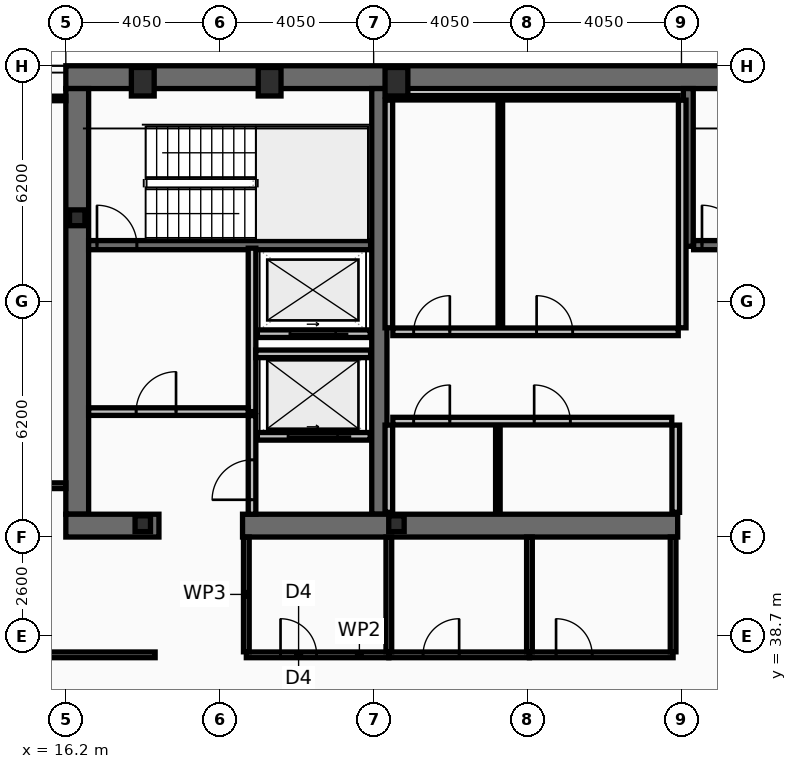
"""IFC4 building model, lengths in metres.
Left out: names, types, materials, properties, quantities, classifications, styles, units other than length and angle.
Written with IfcOpenShell. Run it as: python <this file> out.ifc"""

import sys

from ifc_helpers import new_model, si_unit, direction, frame, frame_2d, origin, origin_2d, place, context, subcontext, project, spatial, rectangle, hollow_rectangle, i_section, extrude, element, fill, save


model = new_model("IFC4")
c1 = context("Model", 3, precision=1e-05, world=origin(), true_north=direction((0.0, 1.0)))
c2 = subcontext(c1, "Body", "Model", "MODEL_VIEW")
j1 = project(units=[si_unit("LENGTHUNIT", "METRE"), si_unit("PLANEANGLEUNIT", "RADIAN")], contexts=[c1])
p1 = place(None, origin())
s1 = spatial("IfcSite", under=j1, at=p1, CompositionType="ELEMENT")
p2 = place(p1, origin())
s2 = spatial("IfcBuilding", under=s1, at=p2, CompositionType="ELEMENT")
p3 = place(p2, frame((0.0, 0.0, 231.8)))
s3 = spatial("IfcBuildingStorey", under=s2, at=p3, CompositionType="ELEMENT", Elevation=231.8)
p4 = place(p3, frame((16.2, 53.4, 0.0), z_axis=(0.0, 0.0, 1.0), x_axis=(1.0, 0.0, 0.0)))
e1 = element("IfcWall", 1, at=p4, inside=s3, PredefinedType="SHEAR", context=c2, shape_type="SweptSolid", body=[
    extrude(rectangle(XDim=40.5, YDim=0.6, at=frame_2d((20.25, 0.0))), origin(), (0.0, 0.0, 1.0), 3.44),
])
p5 = place(p3, frame((16.5, 41.9, 0.0), z_axis=(0.0, 0.0, 1.0), x_axis=(0.0, 1.0, 0.0)))
e2 = element("IfcWall", 2, at=p5, inside=s3, PredefinedType="SHEAR", context=c2, shape_type="SweptSolid", body=[
    extrude(rectangle(XDim=11.2, YDim=0.6, at=frame_2d((5.6, 0.0))), origin(), (0.0, 0.0, 1.0), 3.44),
])
p6 = place(p3, frame((24.45, 41.9, 0.0), z_axis=(0.0, 0.0, 1.0), x_axis=(0.0, 1.0, 0.0)))
e3 = element("IfcWall", 3, at=p6, inside=s3, PredefinedType="SHEAR", context=c2, shape_type="SweptSolid", body=[
    extrude(rectangle(XDim=11.2, YDim=0.4, at=frame_2d((5.6, 0.0))), origin(), (0.0, 0.0, 1.0), 3.44),
])
p7 = place(p3, frame((18.65, 41.6, 0.0), z_axis=(0.0, 0.0, 1.0), x_axis=(-1.0, 0.0, 0.0)))
e4 = element("IfcWall", 4, at=p7, inside=s3, PredefinedType="SHEAR", context=c2, shape_type="SweptSolid", body=[
    extrude(rectangle(XDim=2.45, YDim=0.6, at=frame_2d((1.225, 0.0))), origin(), (0.0, 0.0, 1.0), 3.44),
])
p8 = place(p3, frame((32.3, 41.6, 0.0), z_axis=(0.0, 0.0, 1.0), x_axis=(-1.0, 0.0, 0.0)))
e5 = element("IfcWall", 5, at=p8, inside=s3, PredefinedType="SHEAR", context=c2, shape_type="SweptSolid", body=[
    extrude(rectangle(XDim=11.45, YDim=0.6, at=frame_2d((5.725, 0.0))), origin(), (0.0, 0.0, 1.0), 3.44),
])
p9 = place(p3, frame((32.58, 48.95, 0.0), z_axis=(0.0, 0.0, 1.0), x_axis=(0.0, 1.0, 0.0)))
e6 = element("IfcWall", 6, at=p9, inside=s3, PredefinedType="SHEAR", context=c2, shape_type="SweptSolid", body=[
    extrude(rectangle(XDim=4.15, YDim=0.26, at=frame_2d((2.075, 0.0))), origin(), (0.0, 0.0, 1.0), 3.44),
])
p10 = place(p3, frame((16.8, 48.98, 0.0), z_axis=(0.0, 0.0, 1.0), x_axis=(1.0, 0.0, 0.0)))
e7 = element("IfcWall", 7, at=p10, inside=s3, PredefinedType="SHEAR", context=c2, shape_type="SweptSolid", body=[
    extrude(rectangle(XDim=7.42, YDim=0.24, at=frame_2d((3.71, 0.0))), origin(), (0.0, 0.0, 1.0), 3.44),
])
p11 = place(p10, frame((0.22, 0.0, 0.0)))
e8 = element("IfcOpeningElement", 8, at=p11, cuts=e7, PredefinedType="OPENING", context=c2, shape_type="SweptSolid", body=[
    extrude(rectangle(XDim=1.05, YDim=2.15, at=frame_2d((0.525, 1.075))), frame((0.0, 0.13, 0.0), z_axis=(0.0, -1.0, 0.0), x_axis=(1.0, 0.0, 0.0)), (0.0, 0.0, 1.0), 0.26),
])
p12 = place(p3, frame((32.72, 48.98, 0.0), z_axis=(0.0, 0.0, 1.0), x_axis=(1.0, 0.0, 0.0)))
e9 = element("IfcWall", 9, at=p12, inside=s3, PredefinedType="SHEAR", context=c2, shape_type="SweptSolid", body=[
    extrude(rectangle(XDim=7.56, YDim=0.24, at=frame_2d((3.78, 0.0))), origin(), (0.0, 0.0, 1.0), 3.44),
])
p13 = place(p12, frame((0.22, 0.0, 0.0)))
e10 = element("IfcOpeningElement", 10, at=p13, cuts=e9, PredefinedType="OPENING", context=c2, shape_type="SweptSolid", body=[
    extrude(rectangle(XDim=1.05, YDim=2.15, at=frame_2d((0.525, 1.075))), frame((0.0, 0.13, 0.0), z_axis=(0.0, -1.0, 0.0), x_axis=(1.0, 0.0, 0.0)), (0.0, 0.0, 1.0), 0.26),
])
for number, where, z_axis, x_axis in (
    (11, (18.225, 53.28, 0.0), (0.0, 0.0, 1.0), (1.0, 0.0, 0.0)),
    (12, (21.562, 53.28, 0.0), (0.0, 0.0, 1.0), (1.0, 0.0, 0.0)),
    (13, (24.9, 53.28, 0.0), (0.0, 0.0, 1.0), (1.0, 0.0, 0.0)),
):
    element("IfcColumn", number, at=place(p3, frame(where, z_axis=z_axis, x_axis=x_axis)), inside=s3, PredefinedType="COLUMN", context=c2, shape_type="SweptSolid", body=[
        extrude(hollow_rectangle(XDim=0.6, YDim=0.75, WallThickness=0.045, at=origin_2d()), origin(), (0.0, 0.0, 1.0), 3.6),
    ])
for number, where, z_axis, x_axis in (
    (14, (16.5, 49.7, 0.0), (0.0, 0.0, 1.0), (1.0, 0.0, 0.0)),
    (15, (18.225, 41.65, 0.0), (0.0, 0.0, 1.0), (1.0, 0.0, 0.0)),
    (16, (24.9, 41.65, 0.0), (0.0, 0.0, 1.0), (1.0, 0.0, 0.0)),
):
    element("IfcColumn", number, at=place(p3, frame(where, z_axis=z_axis, x_axis=x_axis)), inside=s3, PredefinedType="COLUMN", context=c2, shape_type="SweptSolid", body=[
        extrude(i_section(OverallWidth=0.406, OverallDepth=0.416, WebThickness=0.03, FlangeThickness=0.048, at=origin_2d()), origin(), (0.0, 0.0, 1.0), 3.6),
    ])
p14 = place(p3, frame((24.21, 43.95, 0.0), z_axis=(0.0, 0.0, 1.0), x_axis=(-1.0, 0.0, 0.0)))
e17 = element("IfcWall", 17, at=p14, inside=s3, PredefinedType="PARTITIONING", context=c2, shape_type="SweptSolid", body=[
    extrude(rectangle(XDim=2.97, YDim=0.2, at=frame_2d((1.485, 0.0))), origin(), (0.0, 0.0, 1.0), 3.44),
])
p15 = place(p14, frame((0.86, 0.0, 0.0)))
e18 = element("IfcOpeningElement", 18, at=p15, cuts=e17, PredefinedType="OPENING", context=c2, shape_type="SweptSolid", body=[
    extrude(rectangle(XDim=1.3, YDim=2.18, at=frame_2d((0.65, 1.09))), frame((0.0, 0.11, 0.0), z_axis=(0.0, -1.0, 0.0), x_axis=(1.0, 0.0, 0.0)), (0.0, 0.0, 1.0), 0.22),
])
p16 = place(p3, frame((24.21, 46.65, 0.0), z_axis=(0.0, 0.0, 1.0), x_axis=(-1.0, 0.0, 0.0)))
e19 = element("IfcWall", 19, at=p16, inside=s3, PredefinedType="PARTITIONING", context=c2, shape_type="SweptSolid", body=[
    extrude(rectangle(XDim=2.97, YDim=0.2, at=frame_2d((1.485, 0.0))), origin(), (0.0, 0.0, 1.0), 3.44),
])
p17 = place(p16, frame((0.91, 0.0, 0.0)))
e20 = element("IfcOpeningElement", 20, at=p17, cuts=e19, PredefinedType="OPENING", context=c2, shape_type="SweptSolid", body=[
    extrude(rectangle(XDim=1.2, YDim=2.18, at=frame_2d((0.6, 1.09))), frame((0.0, 0.11, 0.0), z_axis=(0.0, -1.0, 0.0), x_axis=(1.0, 0.0, 0.0)), (0.0, 0.0, 1.0), 0.22),
])
p18 = place(p3, frame((21.1, 44.6, 0.0), z_axis=(0.0, 0.0, 1.0), x_axis=(0.0, 1.0, 0.0)))
e21 = element("IfcWall", 21, at=p18, inside=s3, PredefinedType="PARTITIONING", context=c2, shape_type="SweptSolid", body=[
    extrude(rectangle(XDim=4.3, YDim=0.2, at=frame_2d((2.15, 0.0))), origin(), (0.0, 0.0, 1.0), 3.44),
])
p19 = place(p3, frame((16.8, 44.6, 0.0), z_axis=(0.0, 0.0, 1.0), x_axis=(1.0, 0.0, 0.0)))
e22 = element("IfcWall", 22, at=p19, inside=s3, PredefinedType="PARTITIONING", context=c2, shape_type="SweptSolid", body=[
    extrude(rectangle(XDim=4.2, YDim=0.2, at=frame_2d((2.1, 0.0))), origin(), (0.0, 0.0, 1.0), 3.44),
])
p20 = place(p19, frame((1.25, 0.0, 0.0)))
e23 = element("IfcOpeningElement", 23, at=p20, cuts=e22, PredefinedType="OPENING", context=c2, shape_type="SweptSolid", body=[
    extrude(rectangle(XDim=1.05, YDim=2.15, at=frame_2d((0.525, 1.075))), frame((0.0, 0.11, 0.0), z_axis=(0.0, -1.0, 0.0), x_axis=(1.0, 0.0, 0.0)), (0.0, 0.0, 1.0), 0.22),
])
p21 = place(p3, frame((21.2, 46.12, 0.0), z_axis=(0.0, 0.0, 1.0), x_axis=(1.0, 0.0, 0.0)))
e24 = element("IfcWall", 24, at=p21, inside=s3, PredefinedType="PARTITIONING", context=c2, shape_type="SweptSolid", body=[
    extrude(rectangle(XDim=3.02, YDim=0.2, at=frame_2d((1.51, 0.0))), origin(), (0.0, 0.0, 1.0), 3.44),
])
p22 = place(p3, frame((21.1, 41.9, 0.0), z_axis=(0.0, 0.0, 1.0), x_axis=(0.0, 1.0, 0.0)))
e25 = element("IfcWall", 25, at=p22, inside=s3, PredefinedType="PARTITIONING", context=c2, shape_type="SweptSolid", body=[
    extrude(rectangle(XDim=2.595, YDim=0.2, at=frame_2d((1.298, 0.0))), origin(), (0.0, 0.0, 1.0), 3.44),
])
p23 = place(p22, frame((0.38, 0.0, 0.0)))
e26 = element("IfcOpeningElement", 26, at=p23, cuts=e25, PredefinedType="OPENING", context=c2, shape_type="SweptSolid", body=[
    extrude(rectangle(XDim=1.05, YDim=2.15, at=frame_2d((0.525, 1.075))), frame((0.0, 0.11, 0.0), z_axis=(0.0, -1.0, 0.0), x_axis=(1.0, 0.0, 0.0)), (0.0, 0.0, 1.0), 0.22),
])
for number, where, z_axis, x_axis in (
    (27, (24.7, 46.805, 0.0), (0.0, 0.0, 1.0), (0.0, 1.0, 0.0)),
    (28, (32.42, 46.805, 0.0), (0.0, 0.0, 1.0), (0.0, 1.0, 0.0)),
):
    element("IfcWall", number, at=place(p3, frame(where, z_axis=z_axis, x_axis=x_axis)), inside=s3, PredefinedType="PARTITIONING", context=c2, shape_type="SweptSolid", body=[
        extrude(rectangle(XDim=5.99, YDim=0.2, at=frame_2d((2.995, 0.0))), origin(), (0.0, 0.0, 1.0), 3.44),
    ])
p24 = place(p3, frame((24.805, 52.86, 0.0), z_axis=(0.0, 0.0, 1.0), x_axis=(1.0, 0.0, 0.0)))
e29 = element("IfcWall", 29, at=p24, inside=s3, PredefinedType="PARTITIONING", context=c2, shape_type="SweptSolid", body=[
    extrude(rectangle(XDim=7.51, YDim=0.12, at=frame_2d((3.755, 0.0))), origin(), (0.0, 0.0, 1.0), 3.44),
])
p25 = place(p3, frame((27.634, 46.805, 0.0), z_axis=(0.0, 0.0, 1.0), x_axis=(0.0, 1.0, 0.0)))
e30 = element("IfcWall", 30, at=p25, inside=s3, PredefinedType="PARTITIONING", context=c2, shape_type="SweptSolid", body=[
    extrude(rectangle(XDim=5.99, YDim=0.12, at=frame_2d((2.995, 0.0))), origin(), (0.0, 0.0, 1.0), 3.44),
])
p26 = place(p3, frame((24.805, 46.7, 0.0), z_axis=(0.0, 0.0, 1.0), x_axis=(1.0, 0.0, 0.0)))
e31 = element("IfcWall", 31, at=p26, inside=s3, PredefinedType="PARTITIONING", context=c2, shape_type="SweptSolid", body=[
    extrude(rectangle(XDim=7.51, YDim=0.2, at=frame_2d((3.755, 0.0))), origin(), (0.0, 0.0, 1.0), 3.44),
])
p27 = place(p26, frame((0.55, 0.0, 0.0)))
e32 = element("IfcOpeningElement", 32, at=p27, cuts=e31, PredefinedType="OPENING", context=c2, shape_type="SweptSolid", body=[
    extrude(rectangle(XDim=0.95, YDim=2.1, at=frame_2d((0.475, 1.05))), frame((0.0, 0.11, 0.0), z_axis=(0.0, -1.0, 0.0), x_axis=(1.0, 0.0, 0.0)), (0.0, 0.0, 1.0), 0.22),
])
p28 = place(p26, frame((3.784, 0.0, 0.0)))
e33 = element("IfcOpeningElement", 33, at=p28, cuts=e31, PredefinedType="OPENING", context=c2, shape_type="SweptSolid", body=[
    extrude(rectangle(XDim=0.95, YDim=2.1, at=frame_2d((0.475, 1.05))), frame((0.0, 0.11, 0.0), z_axis=(0.0, -1.0, 0.0), x_axis=(1.0, 0.0, 0.0)), (0.0, 0.0, 1.0), 0.22),
])
for number, where, z_axis, x_axis in (
    (34, (24.7, 41.95, 0.0), (0.0, 0.0, 1.0), (0.0, 1.0, 0.0)),
    (35, (32.25, 41.95, 0.0), (0.0, 0.0, 1.0), (0.0, 1.0, 0.0)),
):
    element("IfcWall", number, at=place(p3, frame(where, z_axis=z_axis, x_axis=x_axis)), inside=s3, PredefinedType="PARTITIONING", context=c2, shape_type="SweptSolid", body=[
        extrude(rectangle(XDim=2.295, YDim=0.2, at=frame_2d((1.147, 0.0))), origin(), (0.0, 0.0, 1.0), 3.44),
    ])
p29 = place(p3, frame((27.569, 41.95, 0.0), z_axis=(0.0, 0.0, 1.0), x_axis=(0.0, 1.0, 0.0)))
e36 = element("IfcWall", 36, at=p29, inside=s3, PredefinedType="PARTITIONING", context=c2, shape_type="SweptSolid", body=[
    extrude(rectangle(XDim=2.295, YDim=0.12, at=frame_2d((1.147, 0.0))), origin(), (0.0, 0.0, 1.0), 3.44),
])
p30 = place(p3, frame((24.805, 44.35, 0.0), z_axis=(0.0, 0.0, 1.0), x_axis=(1.0, 0.0, 0.0)))
e37 = element("IfcWall", 37, at=p30, inside=s3, PredefinedType="PARTITIONING", context=c2, shape_type="SweptSolid", body=[
    extrude(rectangle(XDim=7.34, YDim=0.2, at=frame_2d((3.67, 0.0))), origin(), (0.0, 0.0, 1.0), 3.44),
])
p31 = place(p30, frame((0.55, 0.0, 0.0)))
e38 = element("IfcOpeningElement", 38, at=p31, cuts=e37, PredefinedType="OPENING", context=c2, shape_type="SweptSolid", body=[
    extrude(rectangle(XDim=0.95, YDim=2.1, at=frame_2d((0.475, 1.05))), frame((0.0, 0.11, 0.0), z_axis=(0.0, -1.0, 0.0), x_axis=(1.0, 0.0, 0.0)), (0.0, 0.0, 1.0), 0.22),
])
p32 = place(p30, frame((3.719, 0.0, 0.0)))
e39 = element("IfcOpeningElement", 39, at=p32, cuts=e37, PredefinedType="OPENING", context=c2, shape_type="SweptSolid", body=[
    extrude(rectangle(XDim=0.95, YDim=2.1, at=frame_2d((0.475, 1.05))), frame((0.0, 0.11, 0.0), z_axis=(0.0, -1.0, 0.0), x_axis=(1.0, 0.0, 0.0)), (0.0, 0.0, 1.0), 0.22),
])
p33 = place(p3, frame((20.95, 38.2, 0.0), z_axis=(0.0, 0.0, 1.0), x_axis=(1.0, 0.0, 0.0)))
e40 = element("IfcWall", 40, at=p33, inside=s3, PredefinedType="PARTITIONING", context=c2, shape_type="SweptSolid", body=[
    extrude(rectangle(XDim=3.75, YDim=0.15, at=frame_2d((1.875, 0.0))), origin(), (0.0, 0.0, 1.0), 2.78),
])
p34 = place(p33, frame((0.9, 0.0, 0.0)))
e41 = element("IfcOpeningElement", 41, at=p34, cuts=e40, PredefinedType="OPENING", context=c2, shape_type="SweptSolid", body=[
    extrude(rectangle(XDim=0.95, YDim=2.05, at=frame_2d((0.475, 1.025))), frame((0.0, 0.085, 0.0), z_axis=(0.0, -1.0, 0.0), x_axis=(1.0, 0.0, 0.0)), (0.0, 0.0, 1.0), 0.17),
])
p35 = place(p3, frame((24.7, 38.2, 0.0), z_axis=(0.0, 0.0, 1.0), x_axis=(1.0, 0.0, 0.0)))
e42 = element("IfcWall", 42, at=p35, inside=s3, PredefinedType="PARTITIONING", context=c2, shape_type="SweptSolid", body=[
    extrude(rectangle(XDim=3.7, YDim=0.15, at=frame_2d((1.85, 0.0))), origin(), (0.0, 0.0, 1.0), 2.78),
])
p36 = place(p35, frame((0.9, 0.0, 0.0)))
e43 = element("IfcOpeningElement", 43, at=p36, cuts=e42, PredefinedType="OPENING", context=c2, shape_type="SweptSolid", body=[
    extrude(rectangle(XDim=0.95, YDim=2.05, at=frame_2d((0.475, 1.025))), frame((0.0, 0.085, 0.0), z_axis=(0.0, -1.0, 0.0), x_axis=(1.0, 0.0, 0.0)), (0.0, 0.0, 1.0), 0.17),
])
p37 = place(p3, frame((28.4, 38.2, 0.0), z_axis=(0.0, 0.0, 1.0), x_axis=(1.0, 0.0, 0.0)))
e44 = element("IfcWall", 44, at=p37, inside=s3, PredefinedType="PARTITIONING", context=c2, shape_type="SweptSolid", body=[
    extrude(rectangle(XDim=3.78, YDim=0.15, at=frame_2d((1.89, 0.0))), origin(), (0.0, 0.0, 1.0), 2.78),
])
p38 = place(p37, frame((0.7, 0.0, 0.0)))
e45 = element("IfcOpeningElement", 45, at=p38, cuts=e44, PredefinedType="OPENING", context=c2, shape_type="SweptSolid", body=[
    extrude(rectangle(XDim=0.95, YDim=2.05, at=frame_2d((0.475, 1.025))), frame((0.0, 0.085, 0.0), z_axis=(0.0, -1.0, 0.0), x_axis=(1.0, 0.0, 0.0)), (0.0, 0.0, 1.0), 0.17),
])
p39 = place(p3, frame((20.95, 38.28, 0.0), z_axis=(0.0, 0.0, 1.0), x_axis=(0.0, 1.0, 0.0)))
e46 = element("IfcWall", 46, at=p39, inside=s3, PredefinedType="PARTITIONING", context=c2, shape_type="SweptSolid", body=[
    extrude(rectangle(XDim=3.02, YDim=0.15, at=frame_2d((1.51, 0.0))), origin(), (0.0, 0.0, 1.0), 3.44),
])
p40 = place(p3, frame((24.7, 38.28, 0.0), z_axis=(0.0, 0.0, 1.0), x_axis=(0.0, 1.0, 0.0)))
e47 = element("IfcWall", 47, at=p40, inside=s3, PredefinedType="PARTITIONING", context=c2, shape_type="SweptSolid", body=[
    extrude(rectangle(XDim=3.02, YDim=0.15, at=frame_2d((1.51, 0.0))), origin(), (0.0, 0.0, 1.0), 2.78),
])
for number, where, z_axis, x_axis in (
    (48, (28.4, 38.28, 0.0), (0.0, 0.0, 1.0), (0.0, 1.0, 0.0)),
    (49, (32.18, 38.28, 0.0), (0.0, 0.0, 1.0), (0.0, 1.0, 0.0)),
):
    element("IfcWall", number, at=place(p3, frame(where, z_axis=z_axis, x_axis=x_axis)), inside=s3, PredefinedType="PARTITIONING", context=c2, shape_type="SweptSolid", body=[
        extrude(rectangle(XDim=3.02, YDim=0.15, at=frame_2d((1.51, 0.0))), origin(), (0.0, 0.0, 1.0), 3.44),
    ])
p41 = place(p3, frame((8.03, 38.2, 0.0), z_axis=(0.0, 0.0, 1.0), x_axis=(1.0, 0.0, 0.0)))
e50 = element("IfcWall", 50, at=p41, inside=s3, PredefinedType="PARTITIONING", context=c2, shape_type="SweptSolid", body=[
    extrude(rectangle(XDim=10.52, YDim=0.15, at=frame_2d((5.26, 0.0))), origin(), (0.0, 0.0, 1.0), 2.78),
])
p42 = place(p41, frame((6.32, 0.0, 0.0)))
e51 = element("IfcOpeningElement", 51, at=p42, cuts=e50, PredefinedType="OPENING", context=c2, shape_type="SweptSolid", body=[
    extrude(rectangle(XDim=0.95, YDim=2.05, at=frame_2d((0.475, 1.025))), frame((0.0, 0.085, 0.0), z_axis=(0.0, -1.0, 0.0), x_axis=(1.0, 0.0, 0.0)), (0.0, 0.0, 1.0), 0.17),
])
p43 = place(p3, frame((8.095, 42.65, 0.0), z_axis=(0.0, 0.0, 1.0), x_axis=(1.0, 0.0, 0.0)))
e52 = element("IfcWall", 52, at=p43, inside=s3, PredefinedType="PARTITIONING", context=c2, shape_type="SweptSolid", body=[
    extrude(rectangle(XDim=8.105, YDim=0.15, at=frame_2d((4.052, 0.0))), origin(), (0.0, 0.0, 1.0), 2.78),
])
p44 = place(p43, frame((6.32, 0.0, 0.0)))
e53 = element("IfcOpeningElement", 53, at=p44, cuts=e52, PredefinedType="OPENING", context=c2, shape_type="SweptSolid", body=[
    extrude(rectangle(XDim=0.9, YDim=2.05, at=frame_2d((0.45, 1.025))), frame((0.0, 0.085, 0.0), z_axis=(0.0, -1.0, 0.0), x_axis=(1.0, 0.0, 0.0)), (0.0, 0.0, 1.0), 0.17),
])
p45 = place(p3, frame((8.095, 52.84, 0.0), z_axis=(0.0, 0.0, 1.0), x_axis=(1.0, 0.0, 0.0)))
e54 = element("IfcWall", 54, at=p45, inside=s3, PredefinedType="PARTITIONING", context=c2, shape_type="SweptSolid", body=[
    extrude(rectangle(XDim=8.105, YDim=0.12, at=frame_2d((4.052, 0.0))), origin(), (0.0, 0.0, 1.0), 3.44),
])
p46 = place(p11, origin())
e55 = element("IfcDoor", 55, at=p46, inside=s3, OperationType="SINGLE_SWING_LEFT", PredefinedType="DOOR", context=c2, shape_type="SweptSolid", body=[
    extrude(rectangle(XDim=1.05, YDim=2.15, at=frame_2d((0.525, 1.075))), frame((0.0, 0.025, 0.0), z_axis=(0.0, -1.0, 0.0), x_axis=(1.0, 0.0, 0.0)), (0.0, 0.0, 1.0), 0.05),
])
fill(e8, e55)
p47 = place(p13, origin())
e56 = element("IfcDoor", 56, at=p47, inside=s3, OperationType="SINGLE_SWING_LEFT", PredefinedType="DOOR", context=c2, shape_type="SweptSolid", body=[
    extrude(rectangle(XDim=1.05, YDim=2.15, at=frame_2d((0.525, 1.075))), frame((0.0, 0.025, 0.0), z_axis=(0.0, -1.0, 0.0), x_axis=(1.0, 0.0, 0.0)), (0.0, 0.0, 1.0), 0.05),
])
fill(e10, e56)
p48 = place(p15, origin())
e57 = element("IfcDoor", 57, at=p48, inside=s3, OperationType="SLIDING_TO_LEFT", PredefinedType="DOOR", context=c2, shape_type="SweptSolid", body=[
    extrude(rectangle(XDim=1.3, YDim=2.18, at=frame_2d((0.65, 1.09))), frame((0.0, 0.025, 0.0), z_axis=(0.0, -1.0, 0.0), x_axis=(1.0, 0.0, 0.0)), (0.0, 0.0, 1.0), 0.05),
])
fill(e18, e57)
p49 = place(p17, origin())
e58 = element("IfcDoor", 58, at=p49, inside=s3, OperationType="SLIDING_TO_LEFT", PredefinedType="DOOR", context=c2, shape_type="SweptSolid", body=[
    extrude(rectangle(XDim=1.2, YDim=2.18, at=frame_2d((0.6, 1.09))), frame((0.0, 0.025, 0.0), z_axis=(0.0, -1.0, 0.0), x_axis=(1.0, 0.0, 0.0)), (0.0, 0.0, 1.0), 0.05),
])
fill(e20, e58)
p50 = place(p20, origin())
e59 = element("IfcDoor", 59, at=p50, inside=s3, OperationType="SINGLE_SWING_RIGHT", PredefinedType="DOOR", context=c2, shape_type="SweptSolid", body=[
    extrude(rectangle(XDim=1.05, YDim=2.15, at=frame_2d((0.525, 1.075))), frame((0.0, 0.025, 0.0), z_axis=(0.0, -1.0, 0.0), x_axis=(1.0, 0.0, 0.0)), (0.0, 0.0, 1.0), 0.05),
])
fill(e23, e59)
p51 = place(p23, origin())
e60 = element("IfcDoor", 60, at=p51, inside=s3, OperationType="SINGLE_SWING_LEFT", PredefinedType="DOOR", context=c2, shape_type="SweptSolid", body=[
    extrude(rectangle(XDim=1.05, YDim=2.15, at=frame_2d((0.525, 1.075))), frame((0.0, 0.025, 0.0), z_axis=(0.0, -1.0, 0.0), x_axis=(1.0, 0.0, 0.0)), (0.0, 0.0, 1.0), 0.05),
])
fill(e26, e60)
p52 = place(p27, origin())
e61 = element("IfcDoor", 61, at=p52, inside=s3, OperationType="SINGLE_SWING_RIGHT", PredefinedType="DOOR", context=c2, shape_type="SweptSolid", body=[
    extrude(rectangle(XDim=0.95, YDim=2.1, at=frame_2d((0.475, 1.05))), frame((0.0, 0.025, 0.0), z_axis=(0.0, -1.0, 0.0), x_axis=(1.0, 0.0, 0.0)), (0.0, 0.0, 1.0), 0.05),
])
fill(e32, e61)
p53 = place(p28, origin())
e62 = element("IfcDoor", 62, at=p53, inside=s3, OperationType="SINGLE_SWING_LEFT", PredefinedType="DOOR", context=c2, shape_type="SweptSolid", body=[
    extrude(rectangle(XDim=0.95, YDim=2.1, at=frame_2d((0.475, 1.05))), frame((0.0, 0.025, 0.0), z_axis=(0.0, -1.0, 0.0), x_axis=(1.0, 0.0, 0.0)), (0.0, 0.0, 1.0), 0.05),
])
fill(e33, e62)
p54 = place(p31, origin())
e63 = element("IfcDoor", 63, at=p54, inside=s3, OperationType="SINGLE_SWING_RIGHT", PredefinedType="DOOR", context=c2, shape_type="SweptSolid", body=[
    extrude(rectangle(XDim=0.95, YDim=2.1, at=frame_2d((0.475, 1.05))), frame((0.0, 0.025, 0.0), z_axis=(0.0, -1.0, 0.0), x_axis=(1.0, 0.0, 0.0)), (0.0, 0.0, 1.0), 0.05),
])
fill(e38, e63)
p55 = place(p32, origin())
e64 = element("IfcDoor", 64, at=p55, inside=s3, OperationType="SINGLE_SWING_LEFT", PredefinedType="DOOR", context=c2, shape_type="SweptSolid", body=[
    extrude(rectangle(XDim=0.95, YDim=2.1, at=frame_2d((0.475, 1.05))), frame((0.0, 0.025, 0.0), z_axis=(0.0, -1.0, 0.0), x_axis=(1.0, 0.0, 0.0)), (0.0, 0.0, 1.0), 0.05),
])
fill(e39, e64)
p56 = place(p34, origin())
e65 = element("IfcDoor", 65, at=p56, inside=s3, OperationType="SINGLE_SWING_LEFT", PredefinedType="DOOR", context=c2, shape_type="SweptSolid", body=[
    extrude(rectangle(XDim=0.95, YDim=2.05, at=frame_2d((0.475, 1.025))), frame((0.0, 0.025, 0.0), z_axis=(0.0, -1.0, 0.0), x_axis=(1.0, 0.0, 0.0)), (0.0, 0.0, 1.0), 0.05),
])
fill(e41, e65)
p57 = place(p36, origin())
e66 = element("IfcDoor", 66, at=p57, inside=s3, OperationType="SINGLE_SWING_RIGHT", PredefinedType="DOOR", context=c2, shape_type="SweptSolid", body=[
    extrude(rectangle(XDim=0.95, YDim=2.05, at=frame_2d((0.475, 1.025))), frame((0.0, 0.025, 0.0), z_axis=(0.0, -1.0, 0.0), x_axis=(1.0, 0.0, 0.0)), (0.0, 0.0, 1.0), 0.05),
])
fill(e43, e66)
p58 = place(p38, origin())
e67 = element("IfcDoor", 67, at=p58, inside=s3, OperationType="SINGLE_SWING_LEFT", PredefinedType="DOOR", context=c2, shape_type="SweptSolid", body=[
    extrude(rectangle(XDim=0.95, YDim=2.05, at=frame_2d((0.475, 1.025))), frame((0.0, 0.025, 0.0), z_axis=(0.0, -1.0, 0.0), x_axis=(1.0, 0.0, 0.0)), (0.0, 0.0, 1.0), 0.05),
])
fill(e45, e67)
save(model, sys.argv[1])
